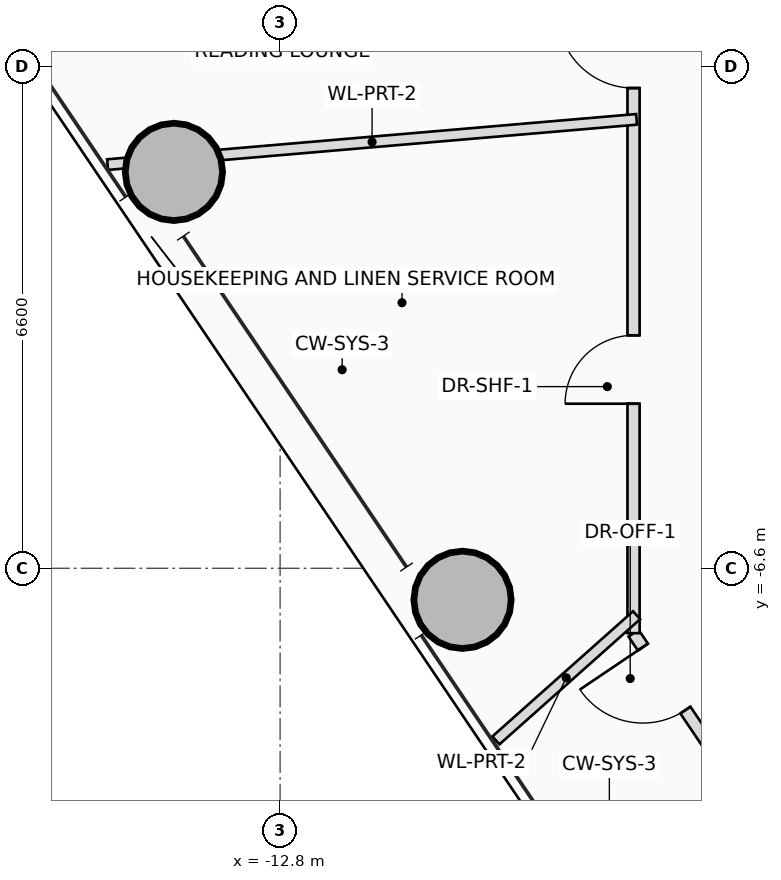
"""IFC4 building model, lengths in metres.
Left out: names, types, materials, properties, quantities, classifications, styles, units other than length and angle.
Written with IfcOpenShell. Run it as: python <this file> out.ifc"""

import sys

from ifc_helpers import new_model, si_unit, direction, frame, frame_2d, origin, origin_2d, place, context, subcontext, project, spatial, rectangle, hollow_circle, extrude, source, transform, mapped, element, fill, save


model = new_model("IFC4")
c1 = context("Model", 3, precision=1e-05, world=origin(), true_north=direction((0.0, 1.0)))
c2 = subcontext(c1, "Body", "Model", "MODEL_VIEW")
j1 = project(units=[si_unit("LENGTHUNIT", "METRE"), si_unit("PLANEANGLEUNIT", "RADIAN")], contexts=[c1])
p1 = place(None, origin())
s1 = spatial("IfcSite", under=j1, at=p1, CompositionType="ELEMENT")
p2 = place(p1, origin())
s2 = spatial("IfcBuilding", under=s1, at=p2, CompositionType="ELEMENT")
p3 = place(p2, frame((0.0, 0.0, 182.9)))
s3 = spatial("IfcBuildingStorey", under=s2, at=p3, CompositionType="ELEMENT", Elevation=182.9)
m1 = source(origin(), c2, "Body", "SweptSolid", [
    extrude(hollow_circle(Radius=0.65, WallThickness=0.045, at=origin_2d()), origin(), (0.0, 0.0, 1.0), 3.45),
])
for number, where, z_axis, x_axis in (
    (1, (-14.198, -1.385, 0.0), (0.0, 0.0, 1.0), (1.0, 0.0, 0.0)),
    (2, (-10.4, -7.015, 0.0), (0.0, 0.0, 1.0), (1.0, 0.0, 0.0)),
):
    element("IfcColumn", number, at=place(p3, frame(where, z_axis=z_axis, x_axis=x_axis)), inside=s3, PredefinedType="COLUMN", context=c2, shape_type="MappedRepresentation", body=[
        mapped(m1, transform((0.0, 0.0, 0.0), scale=1.0)),
    ])
p4 = place(p3, frame((-6.36, -10.107, 0.0), z_axis=(0.0, 0.0, 1.0), x_axis=(-0.559145325895, 0.829069662049, 0.0)))
e3 = element("IfcWall", 3, at=p4, inside=s3, PredefinedType="PARTITIONING", context=c2, shape_type="SweptSolid", body=[
    extrude(rectangle(XDim=3.201, YDim=0.16, at=frame_2d((1.601, 0.0))), origin(), (0.0, 0.0, 1.0), 2.565),
])
p5 = place(p4, frame((1.981, 0.0, 0.0)))
e4 = element("IfcOpeningElement", 4, at=p5, cuts=e3, PredefinedType="OPENING", context=c2, shape_type="SweptSolid", body=[
    extrude(rectangle(XDim=1.0, YDim=2.25, at=frame_2d((0.5, 1.125))), frame((0.0, 0.09, 0.0), z_axis=(0.0, -1.0, 0.0), x_axis=(1.0, 0.0, 0.0)), (0.0, 0.0, 1.0), 0.18),
])
p6 = place(p3, frame((-8.15, -7.454, 0.0), z_axis=(0.0, 0.0, 1.0), x_axis=(0.0, 1.0, 0.0)))
e5 = element("IfcWall", 5, at=p6, inside=s3, PredefinedType="PARTITIONING", context=c2, shape_type="SweptSolid", body=[
    extrude(rectangle(XDim=15.054, YDim=0.16, at=frame_2d((7.527, 0.0))), origin(), (0.0, 0.0, 1.0), 2.565),
])
p7 = place(p6, frame((3.019, 0.0, 0.0)))
e6 = element("IfcOpeningElement", 6, at=p7, cuts=e5, PredefinedType="OPENING", context=c2, shape_type="SweptSolid", body=[
    extrude(rectangle(XDim=0.9, YDim=2.05, at=frame_2d((0.45, 1.025))), frame((0.0, 0.09, 0.0), z_axis=(0.0, -1.0, 0.0), x_axis=(1.0, 0.0, 0.0)), (0.0, 0.0, 1.0), 0.18),
])
p8 = place(p6, frame((7.172, 0.0, 0.0)))
e7 = element("IfcOpeningElement", 7, at=p8, cuts=e5, PredefinedType="OPENING", context=c2, shape_type="SweptSolid", body=[
    extrude(rectangle(XDim=1.0, YDim=2.25, at=frame_2d((0.5, 1.125))), frame((0.0, 0.09, 0.0), z_axis=(0.0, -1.0, 0.0), x_axis=(1.0, 0.0, 0.0)), (0.0, 0.0, 1.0), 0.18),
])
p9 = place(p6, frame((10.563, 0.0, 0.0)))
e8 = element("IfcOpeningElement", 8, at=p9, cuts=e5, PredefinedType="OPENING", context=c2, shape_type="SweptSolid", body=[
    extrude(rectangle(XDim=1.05, YDim=2.2, at=frame_2d((0.525, 1.1))), frame((0.0, 0.09, 0.0), z_axis=(0.0, -1.0, 0.0), x_axis=(1.0, 0.0, 0.0)), (0.0, 0.0, 1.0), 0.18),
])
p10 = place(p3, frame((-8.11, -0.694, 0.0), z_axis=(0.0, 0.0, 1.0), x_axis=(-0.996360400447, -0.085240556199, 0.0)))
e9 = element("IfcWall", 9, at=p10, inside=s3, PredefinedType="PARTITIONING", context=c2, shape_type="SweptSolid", body=[
    extrude(rectangle(XDim=6.986, YDim=0.14, at=frame_2d((3.493, 0.0))), origin(), (0.0, 0.0, 1.0), 2.765),
])
p11 = place(p3, frame((-8.11, -7.217, 0.0), z_axis=(0.0, 0.0, 1.0), x_axis=(-0.747006826924, -0.66481636602, 0.0)))
e10 = element("IfcWall", 10, at=p11, inside=s3, PredefinedType="PARTITIONING", context=c2, shape_type="SweptSolid", body=[
    extrude(rectangle(XDim=2.477, YDim=0.14, at=frame_2d((1.239, 0.0))), origin(), (0.0, 0.0, 1.0), 2.725),
])
p12 = place(p3, frame((-6.755, -9.45, 0.0), z_axis=(0.0, 0.0, 1.0), x_axis=(-0.581461082044, -0.813574219152, 0.0)))
e11 = element("IfcWall", 11, at=p12, inside=s3, PredefinedType="PARTITIONING", context=c2, shape_type="SweptSolid", body=[
    extrude(rectangle(XDim=2.487, YDim=0.14, at=frame_2d((1.243, 0.0))), origin(), (0.0, 0.0, 1.0), 2.725),
])
p13 = place(p5, origin())
e12 = element("IfcDoor", 12, at=p13, inside=s3, OperationType="SINGLE_SWING_RIGHT", PredefinedType="DOOR", context=c2, shape_type="SweptSolid", body=[
    extrude(rectangle(XDim=1.0, YDim=2.25, at=frame_2d((0.5, 1.125))), frame((0.0, 0.025, 0.0), z_axis=(0.0, -1.0, 0.0), x_axis=(1.0, 0.0, 0.0)), (0.0, 0.0, 1.0), 0.05),
])
fill(e4, e12)
p14 = place(p7, origin())
e13 = element("IfcDoor", 13, at=p14, inside=s3, OperationType="SINGLE_SWING_LEFT", PredefinedType="DOOR", context=c2, shape_type="SweptSolid", body=[
    extrude(rectangle(XDim=0.9, YDim=2.05, at=frame_2d((0.45, 1.025))), frame((0.0, 0.025, 0.0), z_axis=(0.0, -1.0, 0.0), x_axis=(1.0, 0.0, 0.0)), (0.0, 0.0, 1.0), 0.05),
])
fill(e6, e13)
p15 = place(p8, origin())
e14 = element("IfcDoor", 14, at=p15, inside=s3, OperationType="SINGLE_SWING_RIGHT", PredefinedType="DOOR", context=c2, shape_type="SweptSolid", body=[
    extrude(rectangle(XDim=1.0, YDim=2.25, at=frame_2d((0.5, 1.125))), frame((0.0, 0.025, 0.0), z_axis=(0.0, -1.0, 0.0), x_axis=(1.0, 0.0, 0.0)), (0.0, 0.0, 1.0), 0.05),
])
fill(e7, e14)
save(model, sys.argv[1])
